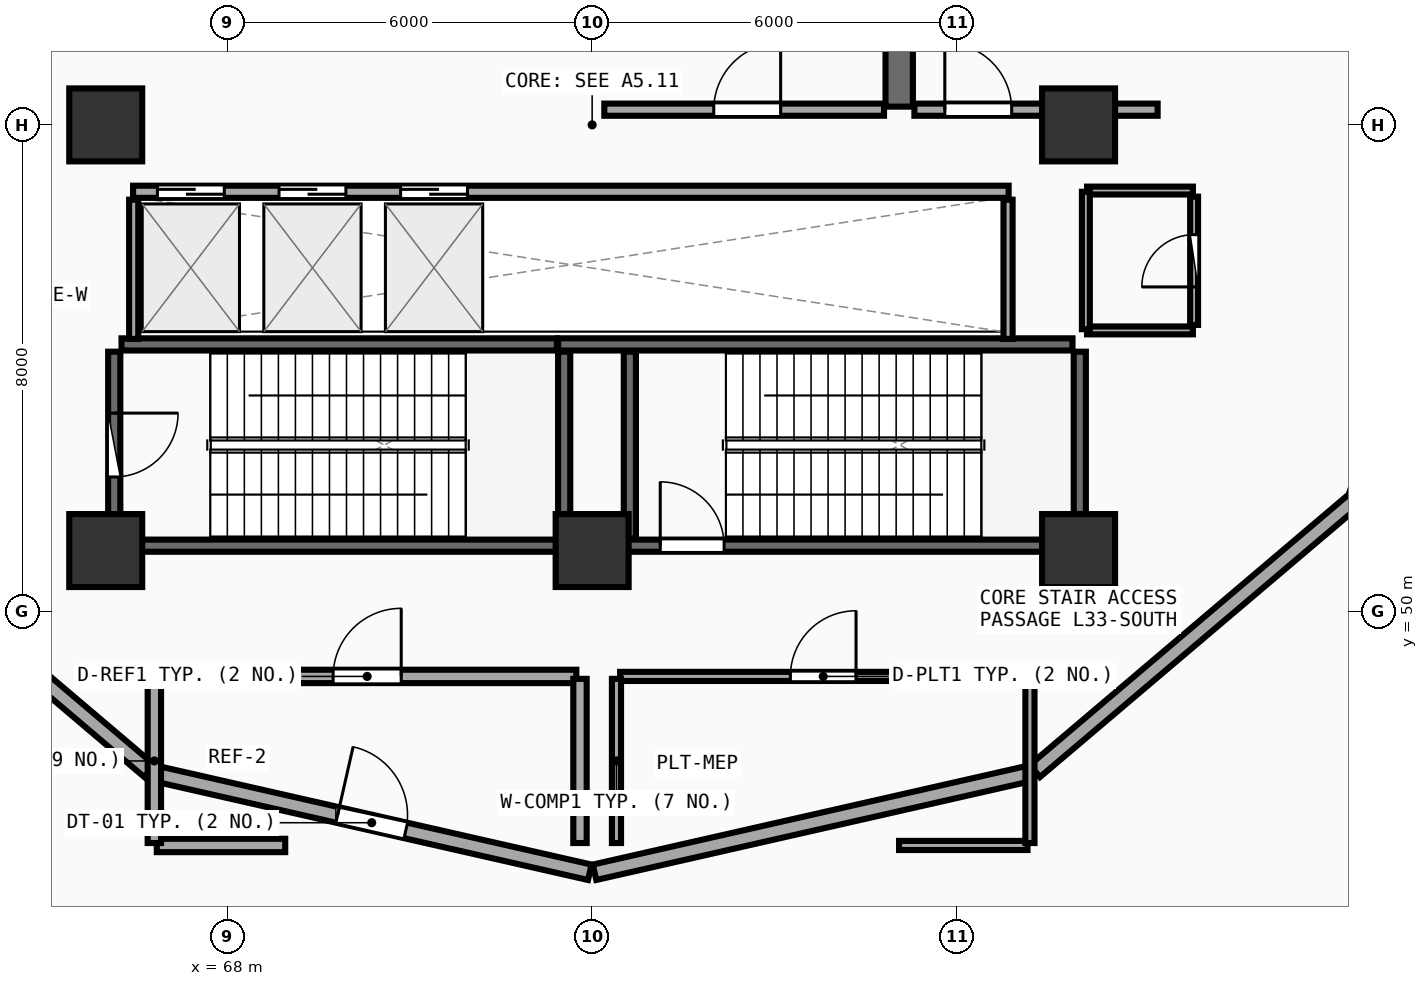
"""IFC4 building model, lengths in metres.
Left out: names, types, materials, properties, quantities, classifications, styles, units other than length and angle.
Written with IfcOpenShell. Run it as: python <this file> out.ifc"""

import sys

from ifc_helpers import new_model, si_unit, direction, frame, frame_2d, origin, origin_2d, place, context, subcontext, project, spatial, rectangle, extrude, element, fill, save


model = new_model("IFC4")
c1 = context("Model", 3, precision=1e-05, world=origin(), true_north=direction((0.0, 1.0)))
c2 = subcontext(c1, "Body", "Model", "MODEL_VIEW")
j1 = project(units=[si_unit("LENGTHUNIT", "METRE"), si_unit("PLANEANGLEUNIT", "RADIAN")], contexts=[c1])
p1 = place(None, origin())
s1 = spatial("IfcSite", under=j1, at=p1, CompositionType="ELEMENT")
p2 = place(p1, origin())
s2 = spatial("IfcBuilding", under=s1, at=p2, CompositionType="ELEMENT")
p3 = place(p2, frame((0.0, 0.0, 129.86)))
s3 = spatial("IfcBuildingStorey", under=s2, at=p3, CompositionType="ELEMENT", Elevation=129.86)
for number, where, z_axis, x_axis in (
    (1, (66.0, 51.0, 0.0), (0.0, 0.0, 1.0), (1.0, 0.0, 0.0)),
    (2, (74.0, 51.0, 0.0), (0.0, 0.0, 1.0), (1.0, 0.0, 0.0)),
    (3, (82.0, 51.0, 0.0), (0.0, 0.0, 1.0), (1.0, 0.0, 0.0)),
    (4, (82.0, 58.0, 0.0), (0.0, 0.0, 1.0), (1.0, 0.0, 0.0)),
    (5, (66.0, 58.0, 0.0), (0.0, 0.0, 1.0), (1.0, 0.0, 0.0)),
):
    element("IfcColumn", number, at=place(p3, frame(where, z_axis=z_axis, x_axis=x_axis)), inside=s3, PredefinedType="PILASTER", context=c2, shape_type="SweptSolid", body=[
        extrude(rectangle(XDim=1.2, YDim=1.2, at=origin_2d()), origin(), (0.0, 0.0, 1.0), 5.74),
    ])
p4 = place(p3, frame((61.473, 51.824, 0.0), z_axis=(0.0, 0.0, 1.0), x_axis=(0.762580748943, -0.646893037018, 0.0)))
e6 = element("IfcWall", 6, at=p4, inside=s3, PredefinedType="SOLIDWALL", context=c2, shape_type="SweptSolid", body=[
    extrude(rectangle(XDim=6.88, YDim=0.26, at=frame_2d((3.44, 0.0))), origin(), (0.0, 0.0, 1.0), 4.96),
])
p5 = place(p3, frame((66.789, 47.339, 0.0), z_axis=(0.0, 0.0, 1.0), x_axis=(0.975128290494, -0.221641189938, 0.0)))
e7 = element("IfcWall", 7, at=p5, inside=s3, PredefinedType="SOLIDWALL", context=c2, shape_type="SweptSolid", body=[
    extrude(rectangle(XDim=7.355, YDim=0.26, at=frame_2d((3.677, 0.0))), origin(), (0.0, 0.0, 1.0), 4.96),
])
p6 = place(p5, frame((3.102, 0.0, 0.0)))
e8 = element("IfcOpeningElement", 8, at=p6, cuts=e7, PredefinedType="OPENING", context=c2, shape_type="SweptSolid", body=[
    extrude(rectangle(XDim=1.15, YDim=2.15, at=frame_2d((0.575, 1.075))), frame((0.0, 0.14, 0.0), z_axis=(0.0, -1.0, 0.0), x_axis=(1.0, 0.0, 0.0)), (0.0, 0.0, 1.0), 0.28),
])
p7 = place(p3, frame((74.039, 45.709, 0.0), z_axis=(0.0, 0.0, 1.0), x_axis=(0.975128290494, 0.221641189938, 0.0)))
e9 = element("IfcWall", 9, at=p7, inside=s3, PredefinedType="SOLIDWALL", context=c2, shape_type="SweptSolid", body=[
    extrude(rectangle(XDim=7.355, YDim=0.26, at=frame_2d((3.677, 0.0))), origin(), (0.0, 0.0, 1.0), 4.96),
])
p8 = place(p3, frame((81.281, 47.374, 0.0), z_axis=(0.0, 0.0, 1.0), x_axis=(0.762580748943, 0.646893037018, 0.0)))
e10 = element("IfcWall", 10, at=p8, inside=s3, PredefinedType="SOLIDWALL", context=c2, shape_type="SweptSolid", body=[
    extrude(rectangle(XDim=6.88, YDim=0.26, at=frame_2d((3.44, 0.0))), origin(), (0.0, 0.0, 1.0), 4.96),
])
p9 = place(p3, frame((74.0, 51.08, 0.0), z_axis=(0.0, 0.0, 1.0), x_axis=(1.0, 0.0, 0.0)))
e11 = element("IfcWall", 11, at=p9, inside=s3, PredefinedType="SHEAR", context=c2, shape_type="SweptSolid", body=[
    extrude(rectangle(XDim=7.9, YDim=0.2, at=frame_2d((3.95, 0.0))), origin(), (0.0, 0.0, 1.0), 5.48),
])
p10 = place(p9, frame((1.12, 0.0, 0.0)))
e12 = element("IfcOpeningElement", 12, at=p10, cuts=e11, PredefinedType="OPENING", context=c2, shape_type="SweptSolid", body=[
    extrude(rectangle(XDim=1.05, YDim=2.1, at=frame_2d((0.525, 1.05))), frame((0.0, 0.11, 0.0), z_axis=(0.0, -1.0, 0.0), x_axis=(1.0, 0.0, 0.0)), (0.0, 0.0, 1.0), 0.22),
])
p11 = place(p3, frame((82.02, 51.2, 0.0), z_axis=(0.0, 0.0, 1.0), x_axis=(0.0, 1.0, 0.0)))
e13 = element("IfcWall", 13, at=p11, inside=s3, PredefinedType="SHEAR", context=c2, shape_type="SweptSolid", body=[
    extrude(rectangle(XDim=3.07, YDim=0.2, at=frame_2d((1.535, 0.0))), origin(), (0.0, 0.0, 1.0), 5.48),
])
p12 = place(p3, frame((81.9, 54.39, 0.0), z_axis=(0.0, 0.0, 1.0), x_axis=(-1.0, 0.0, 0.0)))
e14 = element("IfcWall", 14, at=p12, inside=s3, PredefinedType="SHEAR", context=c2, shape_type="SweptSolid", body=[
    extrude(rectangle(XDim=8.46, YDim=0.2, at=frame_2d((4.23, 0.0))), origin(), (0.0, 0.0, 1.0), 5.48),
])
p13 = place(p3, frame((74.62, 54.27, 0.0), z_axis=(0.0, 0.0, 1.0), x_axis=(0.0, -1.0, 0.0)))
e15 = element("IfcWall", 15, at=p13, inside=s3, PredefinedType="SHEAR", context=c2, shape_type="SweptSolid", body=[
    extrude(rectangle(XDim=3.07, YDim=0.2, at=frame_2d((1.535, 0.0))), origin(), (0.0, 0.0, 1.0), 5.48),
])
p14 = place(p3, frame((66.26, 51.08, 0.0), z_axis=(0.0, 0.0, 1.0), x_axis=(1.0, 0.0, 0.0)))
e16 = element("IfcWall", 16, at=p14, inside=s3, PredefinedType="SHEAR", context=c2, shape_type="SweptSolid", body=[
    extrude(rectangle(XDim=7.16, YDim=0.2, at=frame_2d((3.58, 0.0))), origin(), (0.0, 0.0, 1.0), 5.48),
])
p15 = place(p3, frame((73.54, 51.2, 0.0), z_axis=(0.0, 0.0, 1.0), x_axis=(0.0, 1.0, 0.0)))
e17 = element("IfcWall", 17, at=p15, inside=s3, PredefinedType="SHEAR", context=c2, shape_type="SweptSolid", body=[
    extrude(rectangle(XDim=3.07, YDim=0.2, at=frame_2d((1.535, 0.0))), origin(), (0.0, 0.0, 1.0), 5.48),
])
p16 = place(p3, frame((73.42, 54.39, 0.0), z_axis=(0.0, 0.0, 1.0), x_axis=(-1.0, 0.0, 0.0)))
e18 = element("IfcWall", 18, at=p16, inside=s3, PredefinedType="SHEAR", context=c2, shape_type="SweptSolid", body=[
    extrude(rectangle(XDim=7.16, YDim=0.2, at=frame_2d((3.58, 0.0))), origin(), (0.0, 0.0, 1.0), 5.48),
])
p17 = place(p3, frame((66.14, 54.27, 0.0), z_axis=(0.0, 0.0, 1.0), x_axis=(0.0, -1.0, 0.0)))
e19 = element("IfcWall", 19, at=p17, inside=s3, PredefinedType="SHEAR", context=c2, shape_type="SweptSolid", body=[
    extrude(rectangle(XDim=3.07, YDim=0.2, at=frame_2d((1.535, 0.0))), origin(), (0.0, 0.0, 1.0), 5.48),
])
p18 = place(p17, frame((1.01, 0.0, 0.0)))
e20 = element("IfcOpeningElement", 20, at=p18, cuts=e19, PredefinedType="OPENING", context=c2, shape_type="SweptSolid", body=[
    extrude(rectangle(XDim=1.05, YDim=2.1, at=frame_2d((0.525, 1.05))), frame((0.0, 0.11, 0.0), z_axis=(0.0, -1.0, 0.0), x_axis=(1.0, 0.0, 0.0)), (0.0, 0.0, 1.0), 0.22),
])
p19 = place(p3, frame((79.05, 58.3, 0.0), z_axis=(0.0, 0.0, 1.0), x_axis=(0.0, 1.0, 0.0)))
e21 = element("IfcWall", 21, at=p19, inside=s3, PredefinedType="SHEAR", context=c2, shape_type="SweptSolid", body=[
    extrude(rectangle(XDim=6.3, YDim=0.45, at=frame_2d((3.15, 0.0))), origin(), (0.0, 0.0, 1.0), 5.48),
])
p20 = place(p3, frame((74.2, 58.25, 0.0), z_axis=(0.0, 0.0, 1.0), x_axis=(1.0, 0.0, 0.0)))
e22 = element("IfcWall", 22, at=p20, inside=s3, PredefinedType="SOLIDWALL", context=c2, shape_type="SweptSolid", body=[
    extrude(rectangle(XDim=4.6, YDim=0.2, at=frame_2d((2.3, 0.0))), origin(), (0.0, 0.0, 1.0), 5.47),
])
p21 = place(p20, frame((1.8, 0.0, 0.0)))
e23 = element("IfcOpeningElement", 23, at=p21, cuts=e22, PredefinedType="OPENING", context=c2, shape_type="SweptSolid", body=[
    extrude(rectangle(XDim=1.1, YDim=2.1, at=frame_2d((0.55, 1.05))), frame((0.0, 0.11, 0.0), z_axis=(0.0, -1.0, 0.0), x_axis=(1.0, 0.0, 0.0)), (0.0, 0.0, 1.0), 0.22),
])
p22 = place(p3, frame((79.3, 58.25, 0.0), z_axis=(0.0, 0.0, 1.0), x_axis=(1.0, 0.0, 0.0)))
e24 = element("IfcWall", 24, at=p22, inside=s3, PredefinedType="SOLIDWALL", context=c2, shape_type="SweptSolid", body=[
    extrude(rectangle(XDim=4.0, YDim=0.2, at=frame_2d((2.0, 0.0))), origin(), (0.0, 0.0, 1.0), 4.765),
])
p23 = place(p22, frame((0.5, 0.0, 0.0)))
e25 = element("IfcOpeningElement", 25, at=p23, cuts=e24, PredefinedType="OPENING", context=c2, shape_type="SweptSolid", body=[
    extrude(rectangle(XDim=1.1, YDim=2.1, at=frame_2d((0.55, 1.05))), frame((0.0, 0.11, 0.0), z_axis=(0.0, -1.0, 0.0), x_axis=(1.0, 0.0, 0.0)), (0.0, 0.0, 1.0), 0.22),
])
p24 = place(p3, frame((66.45, 56.9, 0.0), z_axis=(0.0, 0.0, 1.0), x_axis=(1.0, 0.0, 0.0)))
e26 = element("IfcWall", 26, at=p24, inside=s3, PredefinedType="SOLIDWALL", context=c2, shape_type="SweptSolid", body=[
    extrude(rectangle(XDim=14.4, YDim=0.2, at=frame_2d((7.2, 0.0))), origin(), (0.0, 0.0, 1.0), 5.47),
])
p25 = place(p24, frame((0.4, 0.0, 0.0)))
e27 = element("IfcOpeningElement", 27, at=p25, cuts=e26, PredefinedType="OPENING", context=c2, shape_type="SweptSolid", body=[
    extrude(rectangle(XDim=1.1, YDim=2.1, at=frame_2d((0.55, 1.05))), frame((0.0, 0.11, 0.0), z_axis=(0.0, -1.0, 0.0), x_axis=(1.0, 0.0, 0.0)), (0.0, 0.0, 1.0), 0.22),
])
p26 = place(p24, frame((2.4, 0.0, 0.0)))
e28 = element("IfcOpeningElement", 28, at=p26, cuts=e26, PredefinedType="OPENING", context=c2, shape_type="SweptSolid", body=[
    extrude(rectangle(XDim=1.1, YDim=2.1, at=frame_2d((0.55, 1.05))), frame((0.0, 0.11, 0.0), z_axis=(0.0, -1.0, 0.0), x_axis=(1.0, 0.0, 0.0)), (0.0, 0.0, 1.0), 0.22),
])
p27 = place(p24, frame((4.4, 0.0, 0.0)))
e29 = element("IfcOpeningElement", 29, at=p27, cuts=e26, PredefinedType="OPENING", context=c2, shape_type="SweptSolid", body=[
    extrude(rectangle(XDim=1.1, YDim=2.1, at=frame_2d((0.55, 1.05))), frame((0.0, 0.11, 0.0), z_axis=(0.0, -1.0, 0.0), x_axis=(1.0, 0.0, 0.0)), (0.0, 0.0, 1.0), 0.22),
])
for number, where, z_axis, x_axis in (
    (30, (66.46, 54.48, 0.0), (0.0, 0.0, 1.0), (0.0, 1.0, 0.0)),
    (31, (80.84, 54.48, 0.0), (0.0, 0.0, 1.0), (0.0, 1.0, 0.0)),
):
    element("IfcWall", number, at=place(p3, frame(where, z_axis=z_axis, x_axis=x_axis)), inside=s3, PredefinedType="PARTITIONING", context=c2, shape_type="SweptSolid", body=[
        extrude(rectangle(XDim=2.29, YDim=0.15, at=frame_2d((1.145, 0.0))), origin(), (0.0, 0.0, 1.0), 5.47),
    ])
p28 = place(p3, frame((66.86, 48.93, 0.0), z_axis=(0.0, 0.0, 1.0), x_axis=(1.0, 0.0, 0.0)))
e32 = element("IfcWall", 32, at=p28, inside=s3, PredefinedType="SOLIDWALL", context=c2, shape_type="SweptSolid", body=[
    extrude(rectangle(XDim=6.88, YDim=0.22, at=frame_2d((3.44, 0.0))), origin(), (0.0, 0.0, 1.0), 4.965),
])
p29 = place(p28, frame((2.88, 0.0, 0.0)))
e33 = element("IfcOpeningElement", 33, at=p29, cuts=e32, PredefinedType="OPENING", context=c2, shape_type="SweptSolid", body=[
    extrude(rectangle(XDim=1.12, YDim=2.1, at=frame_2d((0.56, 1.05))), frame((0.0, 0.12, 0.0), z_axis=(0.0, -1.0, 0.0), x_axis=(1.0, 0.0, 0.0)), (0.0, 0.0, 1.0), 0.24),
])
p30 = place(p3, frame((74.46, 48.93, 0.0), z_axis=(0.0, 0.0, 1.0), x_axis=(1.0, 0.0, 0.0)))
e34 = element("IfcWall", 34, at=p30, inside=s3, PredefinedType="PARTITIONING", context=c2, shape_type="SweptSolid", body=[
    extrude(rectangle(XDim=6.68, YDim=0.15, at=frame_2d((3.34, 0.0))), origin(), (0.0, 0.0, 1.0), 4.965),
])
p31 = place(p30, frame((2.8, 0.0, 0.0)))
e35 = element("IfcOpeningElement", 35, at=p31, cuts=e34, PredefinedType="OPENING", context=c2, shape_type="SweptSolid", body=[
    extrude(rectangle(XDim=1.08, YDim=2.1, at=frame_2d((0.54, 1.05))), frame((0.0, 0.085, 0.0), z_axis=(0.0, -1.0, 0.0), x_axis=(1.0, 0.0, 0.0)), (0.0, 0.0, 1.0), 0.17),
])
p32 = place(p3, frame((83.9, 54.71, 0.0), z_axis=(0.0, 0.0, 1.0), x_axis=(0.0, 1.0, 0.0)))
e36 = element("IfcWall", 36, at=p32, inside=s3, PredefinedType="PLUMBINGWALL", context=c2, shape_type="SweptSolid", body=[
    extrude(rectangle(XDim=2.11, YDim=0.13, at=frame_2d((1.055, 0.0))), origin(), (0.0, 0.0, 1.0), 5.47),
])
p33 = place(p32, frame((0.625, 0.0, 0.0)))
e37 = element("IfcOpeningElement", 37, at=p33, cuts=e36, PredefinedType="OPENING", context=c2, shape_type="SweptSolid", body=[
    extrude(rectangle(XDim=0.86, YDim=2.05, at=frame_2d((0.43, 1.025))), frame((0.0, 0.075, 0.0), z_axis=(0.0, -1.0, 0.0), x_axis=(1.0, 0.0, 0.0)), (0.0, 0.0, 1.0), 0.15),
])
p34 = place(p3, frame((66.84, 46.15, 0.0), z_axis=(0.0, 0.0, 1.0), x_axis=(1.0, 0.0, 0.0)))
e38 = element("IfcWall", 38, at=p34, inside=s3, PredefinedType="SOLIDWALL", context=c2, shape_type="SweptSolid", body=[
    extrude(rectangle(XDim=2.112, YDim=0.22, at=frame_2d((1.056, 0.0))), origin(), (0.0, 0.0, 1.0), 5.47),
])
for number, where, z_axis, x_axis in (
    (39, (73.8, 46.19, 0.0), (0.0, 0.0, 1.0), (0.0, 1.0, 0.0)),
    (40, (66.8, 48.89, 0.0), (0.0, 0.0, 1.0), (0.0, -1.0, 0.0)),
):
    element("IfcWall", number, at=place(p3, frame(where, z_axis=z_axis, x_axis=x_axis)), inside=s3, PredefinedType="SOLIDWALL", context=c2, shape_type="SweptSolid", body=[
        extrude(rectangle(XDim=2.7, YDim=0.22, at=frame_2d((1.35, 0.0))), origin(), (0.0, 0.0, 1.0), 5.225),
    ])
p35 = place(p3, frame((79.048, 46.15, 0.0), z_axis=(0.0, 0.0, 1.0), x_axis=(1.0, 0.0, 0.0)))
e41 = element("IfcWall", 41, at=p35, inside=s3, PredefinedType="PARTITIONING", context=c2, shape_type="SweptSolid", body=[
    extrude(rectangle(XDim=2.112, YDim=0.15, at=frame_2d((1.056, 0.0))), origin(), (0.0, 0.0, 1.0), 5.47),
])
for number, where, z_axis, x_axis in (
    (42, (81.2, 46.19, 0.0), (0.0, 0.0, 1.0), (0.0, 1.0, 0.0)),
    (43, (74.4, 48.89, 0.0), (0.0, 0.0, 1.0), (0.0, -1.0, 0.0)),
):
    element("IfcWall", number, at=place(p3, frame(where, z_axis=z_axis, x_axis=x_axis)), inside=s3, PredefinedType="PARTITIONING", context=c2, shape_type="SweptSolid", body=[
        extrude(rectangle(XDim=2.7, YDim=0.15, at=frame_2d((1.35, 0.0))), origin(), (0.0, 0.0, 1.0), 5.225),
    ])
for number, where, z_axis, x_axis in (
    (44, (82.14, 54.62, 0.0), (0.0, 0.0, 1.0), (1.0, 0.0, 0.0)),
    (45, (83.88, 56.92, 0.0), (0.0, 0.0, 1.0), (-1.0, 0.0, 0.0)),
):
    element("IfcWall", number, at=place(p3, frame(where, z_axis=z_axis, x_axis=x_axis)), inside=s3, PredefinedType="PLUMBINGWALL", context=c2, shape_type="SweptSolid", body=[
        extrude(rectangle(XDim=1.74, YDim=0.13, at=frame_2d((0.87, 0.0))), origin(), (0.0, 0.0, 1.0), 4.765),
    ])
p36 = place(p3, frame((82.12, 56.9, 0.0), z_axis=(0.0, 0.0, 1.0), x_axis=(0.0, -1.0, 0.0)))
e46 = element("IfcWall", 46, at=p36, inside=s3, PredefinedType="PLUMBINGWALL", context=c2, shape_type="SweptSolid", body=[
    extrude(rectangle(XDim=2.26, YDim=0.13, at=frame_2d((1.13, 0.0))), origin(), (0.0, 0.0, 1.0), 4.765),
])
p37 = place(p6, frame((1.15, 0.0, 0.0), z_axis=(0.0, 0.0, 1.0), x_axis=(-1.0, 0.0, 0.0)))
e47 = element("IfcDoor", 47, at=p37, inside=s3, OperationType="SINGLE_SWING_RIGHT", PredefinedType="DOOR", context=c2, shape_type="SweptSolid", body=[
    extrude(rectangle(XDim=1.15, YDim=2.15, at=frame_2d((0.575, 1.075))), frame((0.0, 0.025, 0.0), z_axis=(0.0, -1.0, 0.0), x_axis=(1.0, 0.0, 0.0)), (0.0, 0.0, 1.0), 0.05),
])
fill(e8, e47)
p38 = place(p10, origin())
e48 = element("IfcDoor", 48, at=p38, inside=s3, OperationType="SINGLE_SWING_LEFT", PredefinedType="DOOR", context=c2, shape_type="SweptSolid", body=[
    extrude(rectangle(XDim=1.05, YDim=2.1, at=frame_2d((0.525, 1.05))), frame((0.0, 0.025, 0.0), z_axis=(0.0, -1.0, 0.0), x_axis=(1.0, 0.0, 0.0)), (0.0, 0.0, 1.0), 0.05),
])
fill(e12, e48)
p39 = place(p18, origin())
e49 = element("IfcDoor", 49, at=p39, inside=s3, OperationType="SINGLE_SWING_LEFT", PredefinedType="DOOR", context=c2, shape_type="SweptSolid", body=[
    extrude(rectangle(XDim=1.05, YDim=2.1, at=frame_2d((0.525, 1.05))), frame((0.0, 0.025, 0.0), z_axis=(0.0, -1.0, 0.0), x_axis=(1.0, 0.0, 0.0)), (0.0, 0.0, 1.0), 0.05),
])
fill(e20, e49)
p40 = place(p21, frame((1.1, 0.0, 0.0), z_axis=(0.0, 0.0, 1.0), x_axis=(-1.0, 0.0, 0.0)))
e50 = element("IfcDoor", 50, at=p40, inside=s3, OperationType="SINGLE_SWING_LEFT", PredefinedType="DOOR", context=c2, shape_type="SweptSolid", body=[
    extrude(rectangle(XDim=1.1, YDim=2.1, at=frame_2d((0.55, 1.05))), frame((0.0, 0.025, 0.0), z_axis=(0.0, -1.0, 0.0), x_axis=(1.0, 0.0, 0.0)), (0.0, 0.0, 1.0), 0.05),
])
fill(e23, e50)
p41 = place(p23, frame((1.1, 0.0, 0.0), z_axis=(0.0, 0.0, 1.0), x_axis=(-1.0, 0.0, 0.0)))
e51 = element("IfcDoor", 51, at=p41, inside=s3, OperationType="SINGLE_SWING_RIGHT", PredefinedType="DOOR", context=c2, shape_type="SweptSolid", body=[
    extrude(rectangle(XDim=1.1, YDim=2.1, at=frame_2d((0.55, 1.05))), frame((0.0, 0.025, 0.0), z_axis=(0.0, -1.0, 0.0), x_axis=(1.0, 0.0, 0.0)), (0.0, 0.0, 1.0), 0.05),
])
fill(e25, e51)
p42 = place(p25, origin())
e52 = element("IfcDoor", 52, at=p42, inside=s3, OperationType="DOUBLE_DOOR_SLIDING", PredefinedType="DOOR", context=c2, shape_type="SweptSolid", body=[
    extrude(rectangle(XDim=1.1, YDim=2.1, at=frame_2d((0.55, 1.05))), frame((0.0, 0.025, 0.0), z_axis=(0.0, -1.0, 0.0), x_axis=(1.0, 0.0, 0.0)), (0.0, 0.0, 1.0), 0.05),
])
fill(e27, e52)
p43 = place(p26, origin())
e53 = element("IfcDoor", 53, at=p43, inside=s3, OperationType="DOUBLE_DOOR_SLIDING", PredefinedType="DOOR", context=c2, shape_type="SweptSolid", body=[
    extrude(rectangle(XDim=1.1, YDim=2.1, at=frame_2d((0.55, 1.05))), frame((0.0, 0.025, 0.0), z_axis=(0.0, -1.0, 0.0), x_axis=(1.0, 0.0, 0.0)), (0.0, 0.0, 1.0), 0.05),
])
fill(e28, e53)
p44 = place(p27, origin())
e54 = element("IfcDoor", 54, at=p44, inside=s3, OperationType="DOUBLE_DOOR_SLIDING", PredefinedType="DOOR", context=c2, shape_type="SweptSolid", body=[
    extrude(rectangle(XDim=1.1, YDim=2.1, at=frame_2d((0.55, 1.05))), frame((0.0, 0.025, 0.0), z_axis=(0.0, -1.0, 0.0), x_axis=(1.0, 0.0, 0.0)), (0.0, 0.0, 1.0), 0.05),
])
fill(e29, e54)
p45 = place(p29, origin())
e55 = element("IfcDoor", 55, at=p45, inside=s3, OperationType="SINGLE_SWING_RIGHT", PredefinedType="DOOR", context=c2, shape_type="SweptSolid", body=[
    extrude(rectangle(XDim=1.12, YDim=2.1, at=frame_2d((0.56, 1.05))), frame((0.0, 0.025, 0.0), z_axis=(0.0, -1.0, 0.0), x_axis=(1.0, 0.0, 0.0)), (0.0, 0.0, 1.0), 0.05),
])
fill(e33, e55)
p46 = place(p31, origin())
e56 = element("IfcDoor", 56, at=p46, inside=s3, OperationType="SINGLE_SWING_RIGHT", PredefinedType="DOOR", context=c2, shape_type="SweptSolid", body=[
    extrude(rectangle(XDim=1.08, YDim=2.1, at=frame_2d((0.54, 1.05))), frame((0.0, 0.025, 0.0), z_axis=(0.0, -1.0, 0.0), x_axis=(1.0, 0.0, 0.0)), (0.0, 0.0, 1.0), 0.05),
])
fill(e35, e56)
p47 = place(p33, origin())
e57 = element("IfcDoor", 57, at=p47, inside=s3, OperationType="SINGLE_SWING_LEFT", PredefinedType="DOOR", context=c2, shape_type="SweptSolid", body=[
    extrude(rectangle(XDim=0.86, YDim=2.05, at=frame_2d((0.43, 1.025))), frame((0.0, 0.025, 0.0), z_axis=(0.0, -1.0, 0.0), x_axis=(1.0, 0.0, 0.0)), (0.0, 0.0, 1.0), 0.05),
])
fill(e37, e57)
save(model, sys.argv[1])
